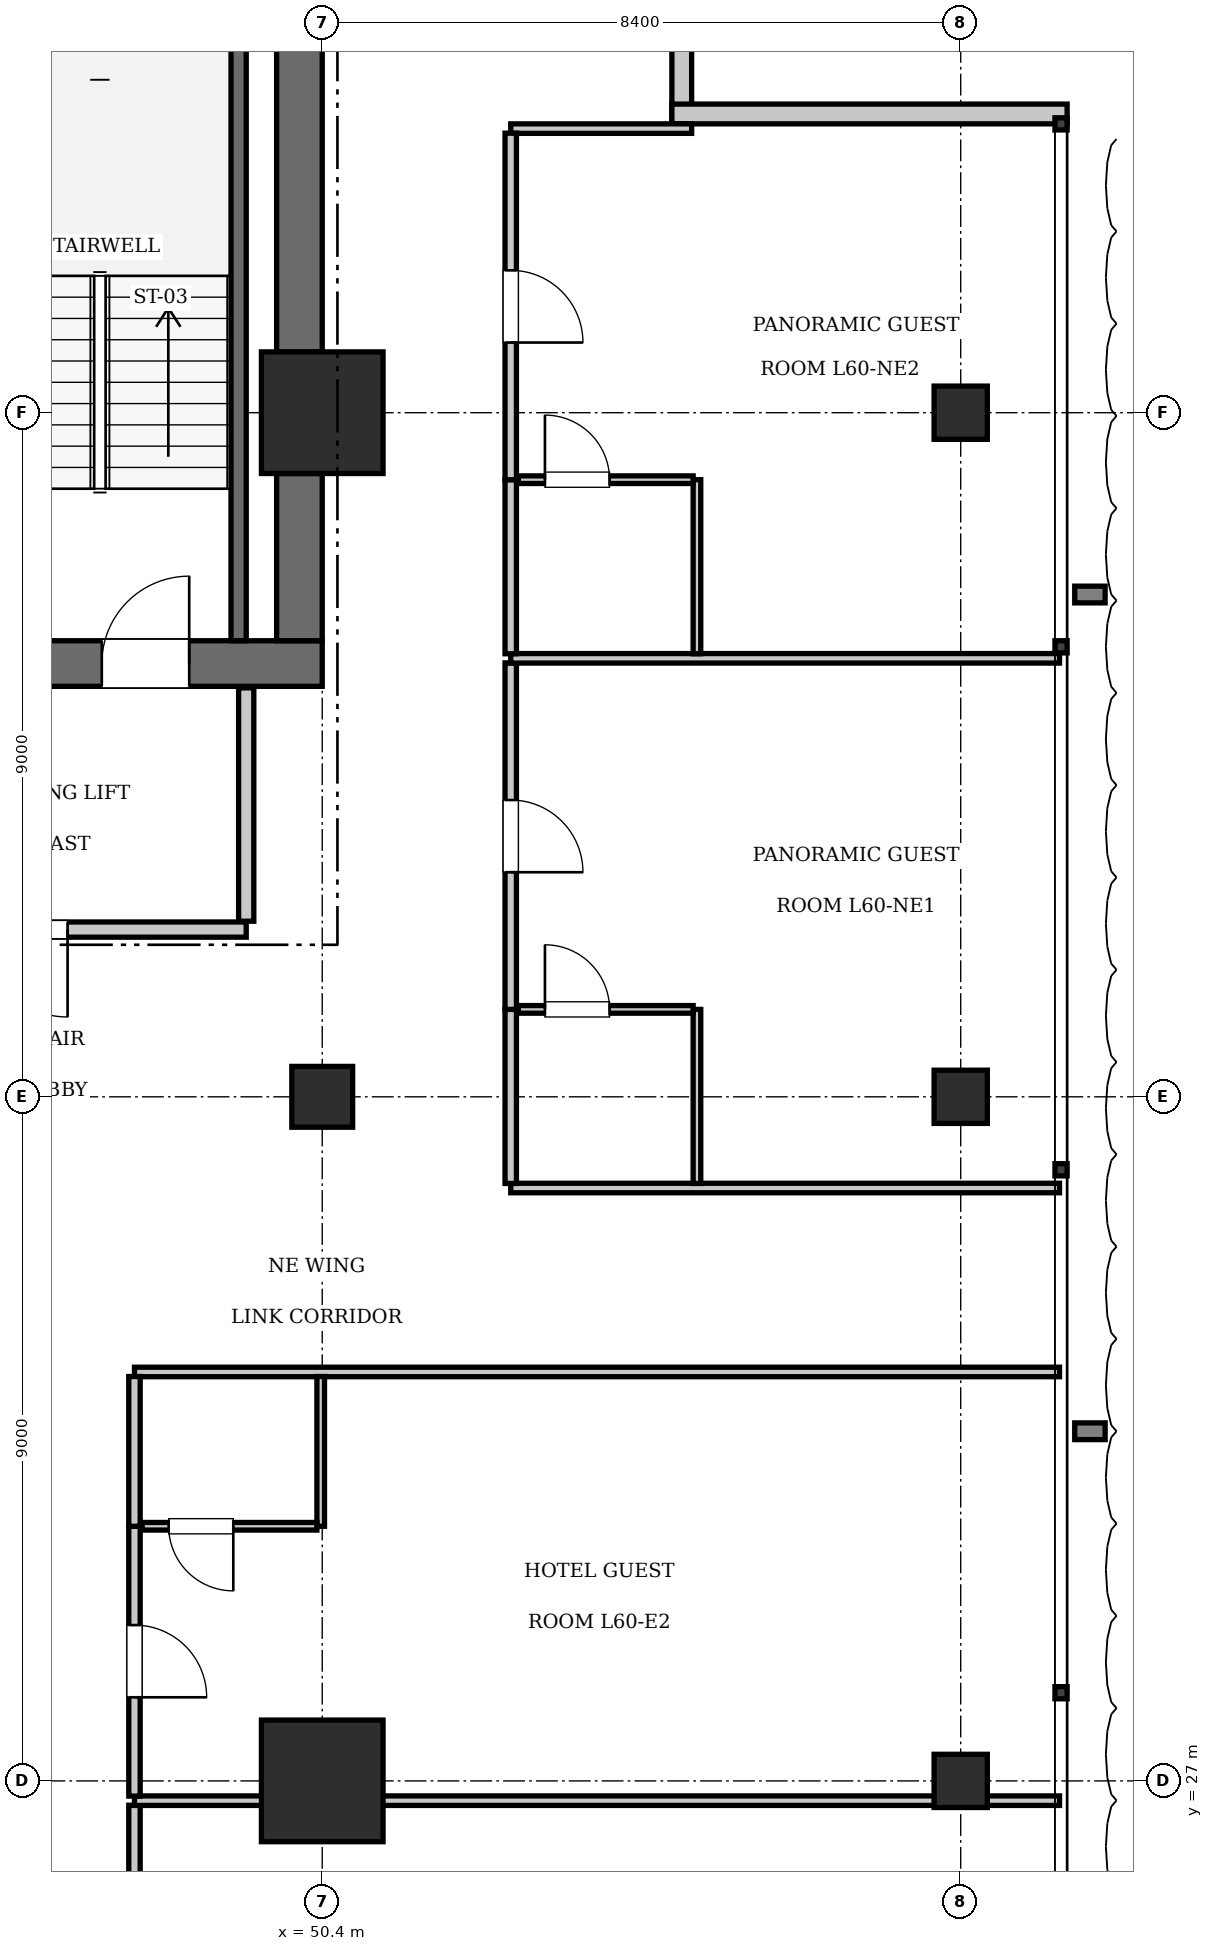
"""IFC4 building model, lengths in metres.
Left out: names, types, materials, properties, quantities, classifications, styles, units other than length and angle.
Written with IfcOpenShell. Run it as: python <this file> out.ifc"""

import sys

from ifc_helpers import new_model, si_unit, direction, frame, frame_2d, origin, origin_2d, place, context, subcontext, project, spatial, rectangle, extrude, element, fill, save


model = new_model("IFC4")
c1 = context("Model", 3, precision=1e-05, world=origin(), true_north=direction((0.0, 1.0)))
c2 = subcontext(c1, "Body", "Model", "MODEL_VIEW")
j1 = project(units=[si_unit("LENGTHUNIT", "METRE"), si_unit("PLANEANGLEUNIT", "RADIAN")], contexts=[c1])
p1 = place(None, origin())
s1 = spatial("IfcSite", under=j1, at=p1, CompositionType="ELEMENT")
p2 = place(p1, origin())
s2 = spatial("IfcBuilding", under=s1, at=p2, CompositionType="ELEMENT")
p3 = place(p2, frame((0.0, 0.0, 247.1)))
s3 = spatial("IfcBuildingStorey", under=s2, at=p3, CompositionType="ELEMENT", Elevation=247.1)
for number, where, z_axis, x_axis in (
    (1, (50.4, 27.0, 0.0), (0.0, 0.0, 1.0), (1.0, 0.0, 0.0)),
    (2, (50.4, 45.0, 0.0), (0.0, 0.0, 1.0), (1.0, 0.0, 0.0)),
):
    element("IfcColumn", number, at=place(p3, frame(where, z_axis=z_axis, x_axis=x_axis)), inside=s3, PredefinedType="COLUMN", context=c2, shape_type="SweptSolid", body=[
        extrude(rectangle(XDim=1.6, YDim=1.6, at=origin_2d()), origin(), (0.0, 0.0, 1.0), 3.85),
    ])
p4 = place(p3, frame((43.6, 41.7, 0.0), z_axis=(0.0, 0.0, 1.0), x_axis=(1.0, 0.0, 0.0)))
e3 = element("IfcWall", 3, at=p4, inside=s3, PredefinedType="SHEAR", context=c2, shape_type="SweptSolid", body=[
    extrude(rectangle(XDim=6.8, YDim=0.6, at=frame_2d((3.4, 0.0))), origin(), (0.0, 0.0, 1.0), 3.85),
])
p5 = place(p4, frame((3.9, 0.0, 0.0)))
e4 = element("IfcOpeningElement", 4, at=p5, cuts=e3, PredefinedType="OPENING", context=c2, shape_type="SweptSolid", body=[
    extrude(rectangle(XDim=1.15, YDim=2.15, at=frame_2d((0.575, 1.075))), frame((0.0, 0.31, 0.0), z_axis=(0.0, -1.0, 0.0), x_axis=(1.0, 0.0, 0.0)), (0.0, 0.0, 1.0), 0.62),
])
p6 = place(p4, frame((0.55, 0.0, 0.0)))
e5 = element("IfcOpeningElement", 5, at=p6, cuts=e3, PredefinedType="OPENING", context=c2, shape_type="SweptSolid", body=[
    extrude(rectangle(XDim=1.1, YDim=2.2, at=frame_2d((0.55, 1.1))), frame((0.0, 0.31, 0.0), z_axis=(0.0, -1.0, 0.0), x_axis=(1.0, 0.0, 0.0)), (0.0, 0.0, 1.0), 0.62),
])
p7 = place(p3, frame((50.1, 42.0, 0.0), z_axis=(0.0, 0.0, 1.0), x_axis=(0.0, 1.0, 0.0)))
e6 = element("IfcWall", 6, at=p7, inside=s3, PredefinedType="SHEAR", context=c2, shape_type="SweptSolid", body=[
    extrude(rectangle(XDim=2.2, YDim=0.6, at=frame_2d((1.1, 0.0))), origin(), (0.0, 0.0, 1.0), 3.85),
])
p8 = place(p3, frame((50.1, 45.8, 0.0), z_axis=(0.0, 0.0, 1.0), x_axis=(0.0, 1.0, 0.0)))
e7 = element("IfcWall", 7, at=p8, inside=s3, PredefinedType="SHEAR", context=c2, shape_type="SweptSolid", body=[
    extrude(rectangle(XDim=7.6, YDim=0.6, at=frame_2d((3.8, 0.0))), origin(), (0.0, 0.0, 1.0), 3.85),
])
p9 = place(p3, frame((50.4, 36.0, 0.0), z_axis=(0.0, 0.0, 1.0), x_axis=(1.0, 0.0, 0.0)))
e8 = element("IfcColumn", 8, at=p9, inside=s3, PredefinedType="COLUMN", context=c2, shape_type="SweptSolid", body=[
    extrude(rectangle(XDim=0.8, YDim=0.8, at=origin_2d()), origin(), (0.0, 0.0, 1.0), 3.85),
])
for number, where, z_axis, x_axis in (
    (9, (58.8, 27.0, 0.0), (0.0, 0.0, 1.0), (1.0, 0.0, 0.0)),
    (10, (58.8, 36.0, 0.0), (0.0, 0.0, 1.0), (1.0, 0.0, 0.0)),
    (11, (58.8, 45.0, 0.0), (0.0, 0.0, 1.0), (1.0, 0.0, 0.0)),
):
    element("IfcColumn", number, at=place(p3, frame(where, z_axis=z_axis, x_axis=x_axis)), inside=s3, PredefinedType="COLUMN", context=c2, shape_type="SweptSolid", body=[
        extrude(rectangle(XDim=0.7, YDim=0.7, at=origin_2d()), origin(), (0.0, 0.0, 1.0), 3.85),
    ])
p10 = place(p3, frame((49.3, 42.0, 0.0), z_axis=(0.0, 0.0, 1.0), x_axis=(0.0, 1.0, 0.0)))
e12 = element("IfcWall", 12, at=p10, inside=s3, PredefinedType="SOLIDWALL", context=c2, shape_type="SweptSolid", body=[
    extrude(rectangle(XDim=9.12, YDim=0.2, at=frame_2d((4.56, 0.0))), origin(), (0.0, 0.0, 1.0), 3.61),
])
for number, where, z_axis, x_axis in (
    (13, (55.13, 54.0, 0.0), (0.0, 0.0, 1.0), (0.0, -1.0, 0.0)),
    (14, (55.0, 48.93, 0.0), (0.0, 0.0, 1.0), (1.0, 0.0, 0.0)),
):
    element("IfcWall", number, at=place(p3, frame(where, z_axis=z_axis, x_axis=x_axis)), inside=s3, PredefinedType="SOLIDWALL", context=c2, shape_type="SweptSolid", body=[
        extrude(rectangle(XDim=5.2, YDim=0.26, at=frame_2d((2.6, 0.0))), origin(), (0.0, 0.0, 1.0), 3.61),
    ])
p11 = place(p3, frame((43.6, 38.2, 0.0), z_axis=(0.0, 0.0, 1.0), x_axis=(1.0, 0.0, 0.0)))
e15 = element("IfcWall", 15, at=p11, inside=s3, PredefinedType="PARTITIONING", context=c2, shape_type="SweptSolid", body=[
    extrude(rectangle(XDim=5.8, YDim=0.2, at=frame_2d((2.9, 0.0))), origin(), (0.0, 0.0, 1.0), 3.61),
])
p12 = place(p11, frame((2.3, 0.0, 0.0)))
e16 = element("IfcOpeningElement", 16, at=p12, cuts=e15, PredefinedType="OPENING", context=c2, shape_type="SweptSolid", body=[
    extrude(rectangle(XDim=1.15, YDim=2.15, at=frame_2d((0.575, 1.075))), frame((0.0, 0.11, 0.0), z_axis=(0.0, -1.0, 0.0), x_axis=(1.0, 0.0, 0.0)), (0.0, 0.0, 1.0), 0.22),
])
p13 = place(p3, frame((49.4, 38.31, 0.0), z_axis=(0.0, 0.0, 1.0), x_axis=(0.0, 1.0, 0.0)))
e17 = element("IfcWall", 17, at=p13, inside=s3, PredefinedType="PARTITIONING", context=c2, shape_type="SweptSolid", body=[
    extrude(rectangle(XDim=3.07, YDim=0.2, at=frame_2d((1.535, 0.0))), origin(), (0.0, 0.0, 1.0), 3.61),
])
p14 = place(p3, frame((47.93, 32.38, 0.0), z_axis=(0.0, 0.0, 1.0), x_axis=(1.0, 0.0, 0.0)))
e18 = element("IfcWall", 18, at=p14, inside=s3, PredefinedType="PARTITIONING", context=c2, shape_type="SweptSolid", body=[
    extrude(rectangle(XDim=12.17, YDim=0.125, at=frame_2d((6.085, 0.0))), origin(), (0.0, 0.0, 1.0), 3.61),
])
p15 = place(p3, frame((47.93, 23.13, 0.0), z_axis=(0.0, 0.0, 1.0), x_axis=(0.0, 1.0, 0.0)))
e19 = element("IfcWall", 19, at=p15, inside=s3, PredefinedType="PARTITIONING", context=c2, shape_type="SweptSolid", body=[
    extrude(rectangle(XDim=3.55, YDim=0.15, at=frame_2d((1.775, 0.0))), origin(), (0.0, 0.0, 1.0), 3.61),
])
p16 = place(p15, frame((1.3, 0.0, 0.0)))
e20 = element("IfcOpeningElement", 20, at=p16, cuts=e19, PredefinedType="OPENING", context=c2, shape_type="SweptSolid", body=[
    extrude(rectangle(XDim=0.95, YDim=2.15, at=frame_2d((0.475, 1.075))), frame((0.0, 0.085, 0.0), z_axis=(0.0, -1.0, 0.0), x_axis=(1.0, 0.0, 0.0)), (0.0, 0.0, 1.0), 0.17),
])
p17 = place(p3, frame((47.93, 26.74, 0.0), z_axis=(0.0, 0.0, 1.0), x_axis=(1.0, 0.0, 0.0)))
e21 = element("IfcWall", 21, at=p17, inside=s3, PredefinedType="PARTITIONING", context=c2, shape_type="SweptSolid", body=[
    extrude(rectangle(XDim=12.17, YDim=0.125, at=frame_2d((6.085, 0.0))), origin(), (0.0, 0.0, 1.0), 2.41),
])
p18 = place(p3, frame((47.93, 26.8, 0.0), z_axis=(0.0, 0.0, 1.0), x_axis=(0.0, 1.0, 0.0)))
e22 = element("IfcWall", 22, at=p18, inside=s3, PredefinedType="PARTITIONING", context=c2, shape_type="SweptSolid", body=[
    extrude(rectangle(XDim=3.55, YDim=0.15, at=frame_2d((1.775, 0.0))), origin(), (0.0, 0.0, 1.0), 3.61),
])
p19 = place(p18, frame((1.3, 0.0, 0.0)))
e23 = element("IfcOpeningElement", 23, at=p19, cuts=e22, PredefinedType="OPENING", context=c2, shape_type="SweptSolid", body=[
    extrude(rectangle(XDim=0.95, YDim=2.15, at=frame_2d((0.475, 1.075))), frame((0.0, 0.085, 0.0), z_axis=(0.0, -1.0, 0.0), x_axis=(1.0, 0.0, 0.0)), (0.0, 0.0, 1.0), 0.17),
])
p20 = place(p3, frame((47.93, 30.35, 0.0), z_axis=(0.0, 0.0, 1.0), x_axis=(0.0, 1.0, 0.0)))
e24 = element("IfcWall", 24, at=p20, inside=s3, PredefinedType="PARTITIONING", context=c2, shape_type="SweptSolid", body=[
    extrude(rectangle(XDim=1.97, YDim=0.15, at=frame_2d((0.985, 0.0))), origin(), (0.0, 0.0, 1.0), 3.61),
])
p21 = place(p3, frame((50.38, 30.35, 0.0), z_axis=(0.0, 0.0, 1.0), x_axis=(0.0, 1.0, 0.0)))
e25 = element("IfcWall", 25, at=p21, inside=s3, PredefinedType="PARTITIONING", context=c2, shape_type="SweptSolid", body=[
    extrude(rectangle(XDim=1.97, YDim=0.1, at=frame_2d((0.985, 0.0))), origin(), (0.0, 0.0, 1.0), 3.077),
])
p22 = place(p3, frame((48.03, 30.35, 0.0), z_axis=(0.0, 0.0, 1.0), x_axis=(1.0, 0.0, 0.0)))
e26 = element("IfcWall", 26, at=p22, inside=s3, PredefinedType="PARTITIONING", context=c2, shape_type="SweptSolid", body=[
    extrude(rectangle(XDim=2.3, YDim=0.1, at=frame_2d((1.15, 0.0))), origin(), (0.0, 0.0, 1.0), 3.61),
])
p23 = place(p22, frame((0.35, 0.0, 0.0)))
e27 = element("IfcOpeningElement", 27, at=p23, cuts=e26, PredefinedType="OPENING", context=c2, shape_type="SweptSolid", body=[
    extrude(rectangle(XDim=0.85, YDim=2.1, at=frame_2d((0.425, 1.05))), frame((0.0, 0.06, 0.0), z_axis=(0.0, -1.0, 0.0), x_axis=(1.0, 0.0, 0.0)), (0.0, 0.0, 1.0), 0.12),
])
p24 = place(p3, frame((52.88, 34.8, 0.0), z_axis=(0.0, 0.0, 1.0), x_axis=(1.0, 0.0, 0.0)))
e28 = element("IfcWall", 28, at=p24, inside=s3, PredefinedType="PARTITIONING", context=c2, shape_type="SweptSolid", body=[
    extrude(rectangle(XDim=7.22, YDim=0.125, at=frame_2d((3.61, 0.0))), origin(), (0.0, 0.0, 1.0), 3.61),
])
p25 = place(p3, frame((52.88, 48.738, 0.0), z_axis=(0.0, 0.0, 1.0), x_axis=(1.0, 0.0, 0.0)))
e29 = element("IfcWall", 29, at=p25, inside=s3, PredefinedType="PARTITIONING", context=c2, shape_type="SweptSolid", body=[
    extrude(rectangle(XDim=2.38, YDim=0.125, at=frame_2d((1.19, 0.0))), origin(), (0.0, 0.0, 1.0), 3.61),
])
p26 = place(p3, frame((52.88, 34.86, 0.0), z_axis=(0.0, 0.0, 1.0), x_axis=(0.0, 1.0, 0.0)))
e30 = element("IfcWall", 30, at=p26, inside=s3, PredefinedType="PARTITIONING", context=c2, shape_type="SweptSolid", body=[
    extrude(rectangle(XDim=2.29, YDim=0.15, at=frame_2d((1.145, 0.0))), origin(), (0.0, 0.0, 1.0), 3.61),
])
p27 = place(p3, frame((52.88, 37.15, 0.0), z_axis=(0.0, 0.0, 1.0), x_axis=(0.0, 1.0, 0.0)))
e31 = element("IfcWall", 31, at=p27, inside=s3, PredefinedType="PARTITIONING", context=c2, shape_type="SweptSolid", body=[
    extrude(rectangle(XDim=4.559, YDim=0.15, at=frame_2d((2.279, 0.0))), origin(), (0.0, 0.0, 1.0), 3.61),
])
p28 = place(p27, frame((1.804, 0.0, 0.0)))
e32 = element("IfcOpeningElement", 32, at=p28, cuts=e31, PredefinedType="OPENING", context=c2, shape_type="SweptSolid", body=[
    extrude(rectangle(XDim=0.95, YDim=2.15, at=frame_2d((0.475, 1.075))), frame((0.0, 0.085, 0.0), z_axis=(0.0, -1.0, 0.0), x_axis=(1.0, 0.0, 0.0)), (0.0, 0.0, 1.0), 0.17),
])
p29 = place(p3, frame((55.33, 34.86, 0.0), z_axis=(0.0, 0.0, 1.0), x_axis=(0.0, 1.0, 0.0)))
e33 = element("IfcWall", 33, at=p29, inside=s3, PredefinedType="PARTITIONING", context=c2, shape_type="SweptSolid", body=[
    extrude(rectangle(XDim=2.29, YDim=0.1, at=frame_2d((1.145, 0.0))), origin(), (0.0, 0.0, 1.0), 3.61),
])
p30 = place(p3, frame((52.98, 37.15, 0.0), z_axis=(0.0, 0.0, 1.0), x_axis=(1.0, 0.0, 0.0)))
e34 = element("IfcWall", 34, at=p30, inside=s3, PredefinedType="PARTITIONING", context=c2, shape_type="SweptSolid", body=[
    extrude(rectangle(XDim=2.3, YDim=0.1, at=frame_2d((1.15, 0.0))), origin(), (0.0, 0.0, 1.0), 3.61),
])
p31 = place(p30, frame((0.35, 0.0, 0.0)))
e35 = element("IfcOpeningElement", 35, at=p31, cuts=e34, PredefinedType="OPENING", context=c2, shape_type="SweptSolid", body=[
    extrude(rectangle(XDim=0.85, YDim=2.1, at=frame_2d((0.425, 1.05))), frame((0.0, 0.06, 0.0), z_axis=(0.0, -1.0, 0.0), x_axis=(1.0, 0.0, 0.0)), (0.0, 0.0, 1.0), 0.12),
])
p32 = place(p3, frame((52.88, 41.769, 0.0), z_axis=(0.0, 0.0, 1.0), x_axis=(1.0, 0.0, 0.0)))
e36 = element("IfcWall", 36, at=p32, inside=s3, PredefinedType="PARTITIONING", context=c2, shape_type="SweptSolid", body=[
    extrude(rectangle(XDim=7.22, YDim=0.125, at=frame_2d((3.61, 0.0))), origin(), (0.0, 0.0, 1.0), 3.61),
])
p33 = place(p3, frame((52.88, 41.829, 0.0), z_axis=(0.0, 0.0, 1.0), x_axis=(0.0, 1.0, 0.0)))
e37 = element("IfcWall", 37, at=p33, inside=s3, PredefinedType="PARTITIONING", context=c2, shape_type="SweptSolid", body=[
    extrude(rectangle(XDim=2.29, YDim=0.15, at=frame_2d((1.145, 0.0))), origin(), (0.0, 0.0, 1.0), 3.61),
])
p34 = place(p3, frame((52.88, 44.119, 0.0), z_axis=(0.0, 0.0, 1.0), x_axis=(0.0, 1.0, 0.0)))
e38 = element("IfcWall", 38, at=p34, inside=s3, PredefinedType="PARTITIONING", context=c2, shape_type="SweptSolid", body=[
    extrude(rectangle(XDim=4.559, YDim=0.15, at=frame_2d((2.279, 0.0))), origin(), (0.0, 0.0, 1.0), 3.61),
])
p35 = place(p34, frame((1.804, 0.0, 0.0)))
e39 = element("IfcOpeningElement", 39, at=p35, cuts=e38, PredefinedType="OPENING", context=c2, shape_type="SweptSolid", body=[
    extrude(rectangle(XDim=0.95, YDim=2.15, at=frame_2d((0.475, 1.075))), frame((0.0, 0.085, 0.0), z_axis=(0.0, -1.0, 0.0), x_axis=(1.0, 0.0, 0.0)), (0.0, 0.0, 1.0), 0.17),
])
p36 = place(p3, frame((55.33, 41.829, 0.0), z_axis=(0.0, 0.0, 1.0), x_axis=(0.0, 1.0, 0.0)))
e40 = element("IfcWall", 40, at=p36, inside=s3, PredefinedType="PARTITIONING", context=c2, shape_type="SweptSolid", body=[
    extrude(rectangle(XDim=2.29, YDim=0.1, at=frame_2d((1.145, 0.0))), origin(), (0.0, 0.0, 1.0), 3.61),
])
p37 = place(p3, frame((52.98, 44.119, 0.0), z_axis=(0.0, 0.0, 1.0), x_axis=(1.0, 0.0, 0.0)))
e41 = element("IfcWall", 41, at=p37, inside=s3, PredefinedType="PARTITIONING", context=c2, shape_type="SweptSolid", body=[
    extrude(rectangle(XDim=2.3, YDim=0.1, at=frame_2d((1.15, 0.0))), origin(), (0.0, 0.0, 1.0), 3.61),
])
p38 = place(p37, frame((0.35, 0.0, 0.0)))
e42 = element("IfcOpeningElement", 42, at=p38, cuts=e41, PredefinedType="OPENING", context=c2, shape_type="SweptSolid", body=[
    extrude(rectangle(XDim=0.85, YDim=2.1, at=frame_2d((0.425, 1.05))), frame((0.0, 0.06, 0.0), z_axis=(0.0, -1.0, 0.0), x_axis=(1.0, 0.0, 0.0)), (0.0, 0.0, 1.0), 0.12),
])
p39 = place(p5, origin())
e43 = element("IfcDoor", 43, at=p39, inside=s3, OperationType="SINGLE_SWING_RIGHT", PredefinedType="DOOR", context=c2, shape_type="SweptSolid", body=[
    extrude(rectangle(XDim=1.15, YDim=2.15, at=frame_2d((0.575, 1.075))), frame((0.0, 0.025, 0.0), z_axis=(0.0, -1.0, 0.0), x_axis=(1.0, 0.0, 0.0)), (0.0, 0.0, 1.0), 0.05),
])
fill(e4, e43)
p40 = place(p12, frame((1.15, 0.0, 0.0), z_axis=(0.0, 0.0, 1.0), x_axis=(-1.0, 0.0, 0.0)))
e44 = element("IfcDoor", 44, at=p40, inside=s3, OperationType="SINGLE_SWING_LEFT", PredefinedType="DOOR", context=c2, shape_type="SweptSolid", body=[
    extrude(rectangle(XDim=1.15, YDim=2.15, at=frame_2d((0.575, 1.075))), frame((0.0, 0.025, 0.0), z_axis=(0.0, -1.0, 0.0), x_axis=(1.0, 0.0, 0.0)), (0.0, 0.0, 1.0), 0.05),
])
fill(e16, e44)
p41 = place(p23, frame((0.85, 0.0, 0.0), z_axis=(0.0, 0.0, 1.0), x_axis=(-1.0, 0.0, 0.0)))
e45 = element("IfcDoor", 45, at=p41, inside=s3, OperationType="SINGLE_SWING_LEFT", PredefinedType="DOOR", context=c2, shape_type="SweptSolid", body=[
    extrude(rectangle(XDim=0.85, YDim=2.1, at=frame_2d((0.425, 1.05))), frame((0.0, 0.025, 0.0), z_axis=(0.0, -1.0, 0.0), x_axis=(1.0, 0.0, 0.0)), (0.0, 0.0, 1.0), 0.05),
])
fill(e27, e45)
p42 = place(p19, frame((0.95, 0.0, 0.0), z_axis=(0.0, 0.0, 1.0), x_axis=(-1.0, 0.0, 0.0)))
e46 = element("IfcDoor", 46, at=p42, inside=s3, OperationType="SINGLE_SWING_RIGHT", PredefinedType="DOOR", context=c2, shape_type="SweptSolid", body=[
    extrude(rectangle(XDim=0.95, YDim=2.15, at=frame_2d((0.475, 1.075))), frame((0.0, 0.025, 0.0), z_axis=(0.0, -1.0, 0.0), x_axis=(1.0, 0.0, 0.0)), (0.0, 0.0, 1.0), 0.05),
])
fill(e23, e46)
p43 = place(p31, origin())
e47 = element("IfcDoor", 47, at=p43, inside=s3, OperationType="SINGLE_SWING_LEFT", PredefinedType="DOOR", context=c2, shape_type="SweptSolid", body=[
    extrude(rectangle(XDim=0.85, YDim=2.1, at=frame_2d((0.425, 1.05))), frame((0.0, 0.025, 0.0), z_axis=(0.0, -1.0, 0.0), x_axis=(1.0, 0.0, 0.0)), (0.0, 0.0, 1.0), 0.05),
])
fill(e35, e47)
p44 = place(p28, frame((0.95, 0.0, 0.0), z_axis=(0.0, 0.0, 1.0), x_axis=(-1.0, 0.0, 0.0)))
e48 = element("IfcDoor", 48, at=p44, inside=s3, OperationType="SINGLE_SWING_RIGHT", PredefinedType="DOOR", context=c2, shape_type="SweptSolid", body=[
    extrude(rectangle(XDim=0.95, YDim=2.15, at=frame_2d((0.475, 1.075))), frame((0.0, 0.025, 0.0), z_axis=(0.0, -1.0, 0.0), x_axis=(1.0, 0.0, 0.0)), (0.0, 0.0, 1.0), 0.05),
])
fill(e32, e48)
p45 = place(p38, origin())
e49 = element("IfcDoor", 49, at=p45, inside=s3, OperationType="SINGLE_SWING_LEFT", PredefinedType="DOOR", context=c2, shape_type="SweptSolid", body=[
    extrude(rectangle(XDim=0.85, YDim=2.1, at=frame_2d((0.425, 1.05))), frame((0.0, 0.025, 0.0), z_axis=(0.0, -1.0, 0.0), x_axis=(1.0, 0.0, 0.0)), (0.0, 0.0, 1.0), 0.05),
])
fill(e42, e49)
p46 = place(p35, frame((0.95, 0.0, 0.0), z_axis=(0.0, 0.0, 1.0), x_axis=(-1.0, 0.0, 0.0)))
e50 = element("IfcDoor", 50, at=p46, inside=s3, OperationType="SINGLE_SWING_RIGHT", PredefinedType="DOOR", context=c2, shape_type="SweptSolid", body=[
    extrude(rectangle(XDim=0.95, YDim=2.15, at=frame_2d((0.475, 1.075))), frame((0.0, 0.025, 0.0), z_axis=(0.0, -1.0, 0.0), x_axis=(1.0, 0.0, 0.0)), (0.0, 0.0, 1.0), 0.05),
])
fill(e39, e50)
save(model, sys.argv[1])
